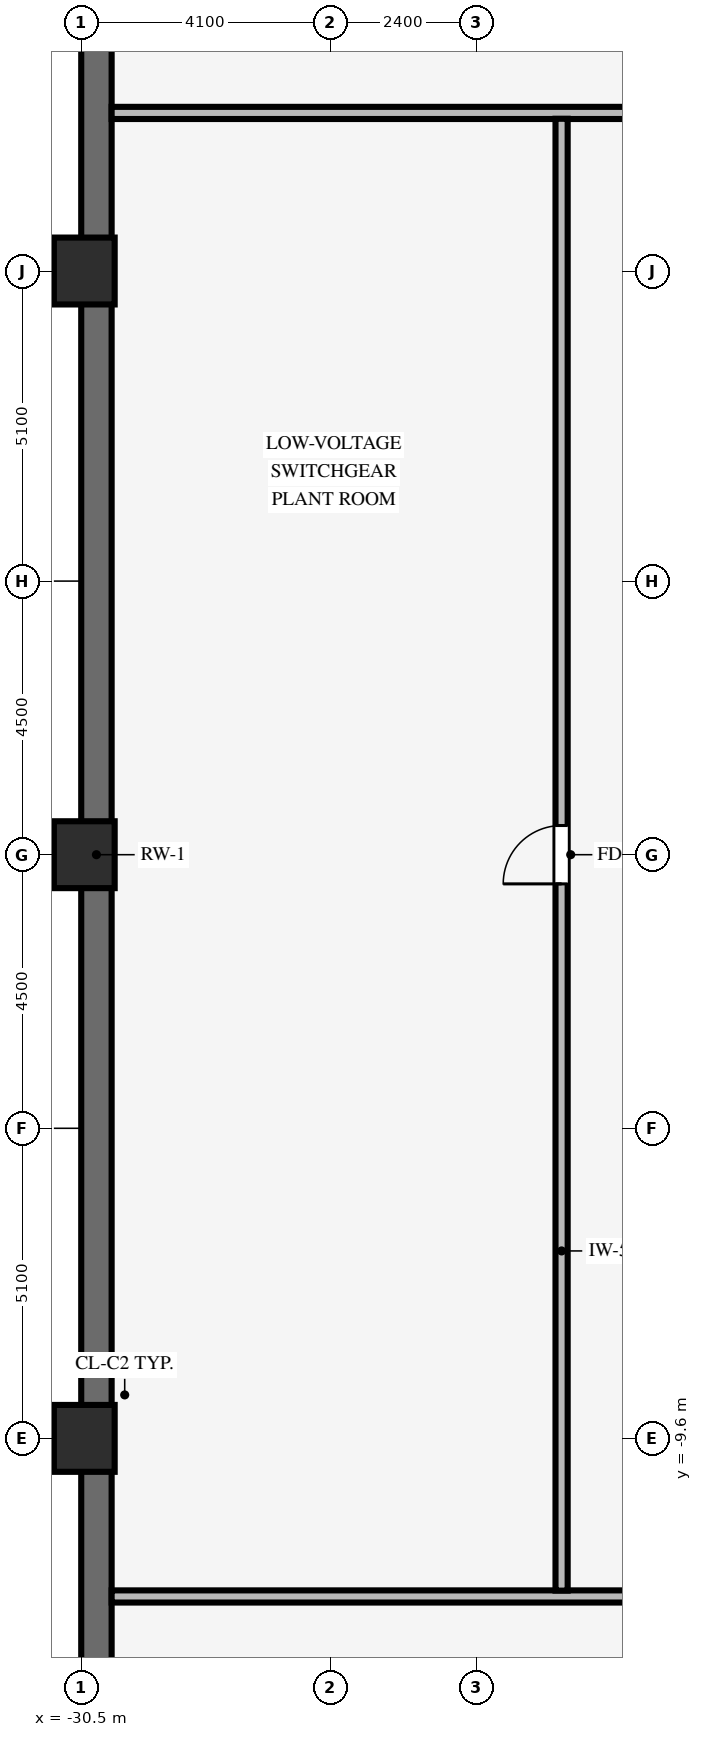
"""IFC4 building model, lengths in metres.
Left out: names, types, materials, properties, quantities, classifications, styles, units other than length and angle.
Written with IfcOpenShell. Run it as: python <this file> out.ifc"""

import sys

from ifc_helpers import new_model, si_unit, direction, frame, frame_2d, origin, origin_2d, place, context, subcontext, project, spatial, rectangle, extrude, source, transform, mapped, element, fill, save


model = new_model("IFC4")
c1 = context("Model", 3, precision=1e-05, world=origin(), true_north=direction((0.0, 1.0)))
c2 = subcontext(c1, "Body", "Model", "MODEL_VIEW")
j1 = project(units=[si_unit("LENGTHUNIT", "METRE"), si_unit("PLANEANGLEUNIT", "RADIAN")], contexts=[c1])
p1 = place(None, origin())
s1 = spatial("IfcSite", under=j1, at=p1, CompositionType="ELEMENT")
p2 = place(p1, origin())
s2 = spatial("IfcBuilding", under=s1, at=p2, CompositionType="ELEMENT")
p3 = place(p2, frame((0.0, 0.0, -4.2)))
s3 = spatial("IfcBuildingStorey", under=s2, at=p3, CompositionType="ELEMENT", Elevation=-4.2)
p4 = place(p3, frame((-30.25, -25.505, 0.0), z_axis=(0.0, 0.0, 1.0), x_axis=(0.0, 1.0, 0.0)))
e1 = element("IfcWall", 1, at=p4, inside=s3, PredefinedType="SOLIDWALL", context=c2, shape_type="SweptSolid", body=[
    extrude(rectangle(XDim=51.01, YDim=0.5, at=frame_2d((25.505, 0.0))), origin(), (0.0, 0.0, 1.0), 3.88),
])
for number, where, z_axis, x_axis in (
    (2, (-30.5, -9.6, 0.0), (0.0, 0.0, 1.0), (1.0, 0.0, 0.0)),
    (3, (-30.5, 0.0, 0.0), (0.0, 0.0, 1.0), (1.0, 0.0, 0.0)),
    (4, (-30.5, 9.6, 0.0), (0.0, 0.0, 1.0), (1.0, 0.0, 0.0)),
):
    element("IfcColumn", number, at=place(p3, frame(where, z_axis=z_axis, x_axis=x_axis)), inside=s3, PredefinedType="COLUMN", context=c2, shape_type="SweptSolid", body=[
        extrude(rectangle(XDim=1.1, YDim=1.1, at=origin_2d()), origin(), (0.0, 0.0, 1.0), 3.88),
    ])
p5 = place(p3, frame((-30.0, -12.2, 0.0), z_axis=(0.0, 0.0, 1.0), x_axis=(1.0, 0.0, 0.0)))
e5 = element("IfcWall", 5, at=p5, inside=s3, PredefinedType="STANDARD", context=c2, shape_type="SweptSolid", body=[
    extrude(rectangle(XDim=60.0, YDim=0.2, at=frame_2d((30.0, 0.0))), origin(), (0.0, 0.0, 1.0), 3.87),
])
p6 = place(p5, frame((15.12, 0.0, 0.0)))
e6 = element("IfcOpeningElement", 6, at=p6, cuts=e5, PredefinedType="OPENING", context=c2, shape_type="SweptSolid", body=[
    extrude(rectangle(XDim=0.96, YDim=2.1, at=frame_2d((0.48, 1.05))), frame((0.0, 0.11, 0.0), z_axis=(0.0, -1.0, 0.0), x_axis=(1.0, 0.0, 0.0)), (0.0, 0.0, 1.0), 0.22),
])
p7 = place(p5, frame((43.92, 0.0, 0.0)))
e7 = element("IfcOpeningElement", 7, at=p7, cuts=e5, PredefinedType="OPENING", context=c2, shape_type="SweptSolid", body=[
    extrude(rectangle(XDim=0.96, YDim=2.1, at=frame_2d((0.48, 1.05))), frame((0.0, 0.11, 0.0), z_axis=(0.0, -1.0, 0.0), x_axis=(1.0, 0.0, 0.0)), (0.0, 0.0, 1.0), 0.22),
])
p8 = place(p3, frame((-30.0, 12.2, 0.0), z_axis=(0.0, 0.0, 1.0), x_axis=(1.0, 0.0, 0.0)))
e8 = element("IfcWall", 8, at=p8, inside=s3, PredefinedType="STANDARD", context=c2, shape_type="SweptSolid", body=[
    extrude(rectangle(XDim=60.0, YDim=0.2, at=frame_2d((30.0, 0.0))), origin(), (0.0, 0.0, 1.0), 3.87),
])
p9 = place(p8, frame((15.12, 0.0, 0.0)))
e9 = element("IfcOpeningElement", 9, at=p9, cuts=e8, PredefinedType="OPENING", context=c2, shape_type="SweptSolid", body=[
    extrude(rectangle(XDim=0.96, YDim=2.1, at=frame_2d((0.48, 1.05))), frame((0.0, 0.11, 0.0), z_axis=(0.0, -1.0, 0.0), x_axis=(1.0, 0.0, 0.0)), (0.0, 0.0, 1.0), 0.22),
])
p10 = place(p8, frame((43.92, 0.0, 0.0)))
e10 = element("IfcOpeningElement", 10, at=p10, cuts=e8, PredefinedType="OPENING", context=c2, shape_type="SweptSolid", body=[
    extrude(rectangle(XDim=0.96, YDim=2.1, at=frame_2d((0.48, 1.05))), frame((0.0, 0.11, 0.0), z_axis=(0.0, -1.0, 0.0), x_axis=(1.0, 0.0, 0.0)), (0.0, 0.0, 1.0), 0.22),
])
p11 = place(p3, frame((-22.6, -12.104, 0.0), z_axis=(0.0, 0.0, 1.0), x_axis=(0.0, 1.0, 0.0)))
e11 = element("IfcWall", 11, at=p11, inside=s3, PredefinedType="STANDARD", context=c2, shape_type="SweptSolid", body=[
    extrude(rectangle(XDim=24.208, YDim=0.2, at=frame_2d((12.104, 0.0))), origin(), (0.0, 0.0, 1.0), 3.87),
])
p12 = place(p11, frame((11.624, 0.0, 0.0)))
e12 = element("IfcOpeningElement", 12, at=p12, cuts=e11, PredefinedType="OPENING", context=c2, shape_type="SweptSolid", body=[
    extrude(rectangle(XDim=0.96, YDim=2.1, at=frame_2d((0.48, 1.05))), frame((0.0, 0.11, 0.0), z_axis=(0.0, -1.0, 0.0), x_axis=(1.0, 0.0, 0.0)), (0.0, 0.0, 1.0), 0.22),
])
m1 = source(origin(), c2, "Body", "SweptSolid", [
    extrude(rectangle(XDim=0.96, YDim=2.1, at=frame_2d((0.48, 1.05))), frame((0.0, 0.025, 0.0), z_axis=(0.0, -1.0, 0.0), x_axis=(1.0, 0.0, 0.0)), (0.0, 0.0, 1.0), 0.05),
])
p13 = place(p12, origin())
e13 = element("IfcDoor", 13, at=p13, inside=s3, OperationType="SINGLE_SWING_LEFT", PredefinedType="DOOR", context=c2, shape_type="MappedRepresentation", body=[
    mapped(m1, transform((0.0, 0.0, 0.0), scale=1.0)),
])
fill(e12, e13)
save(model, sys.argv[1])
